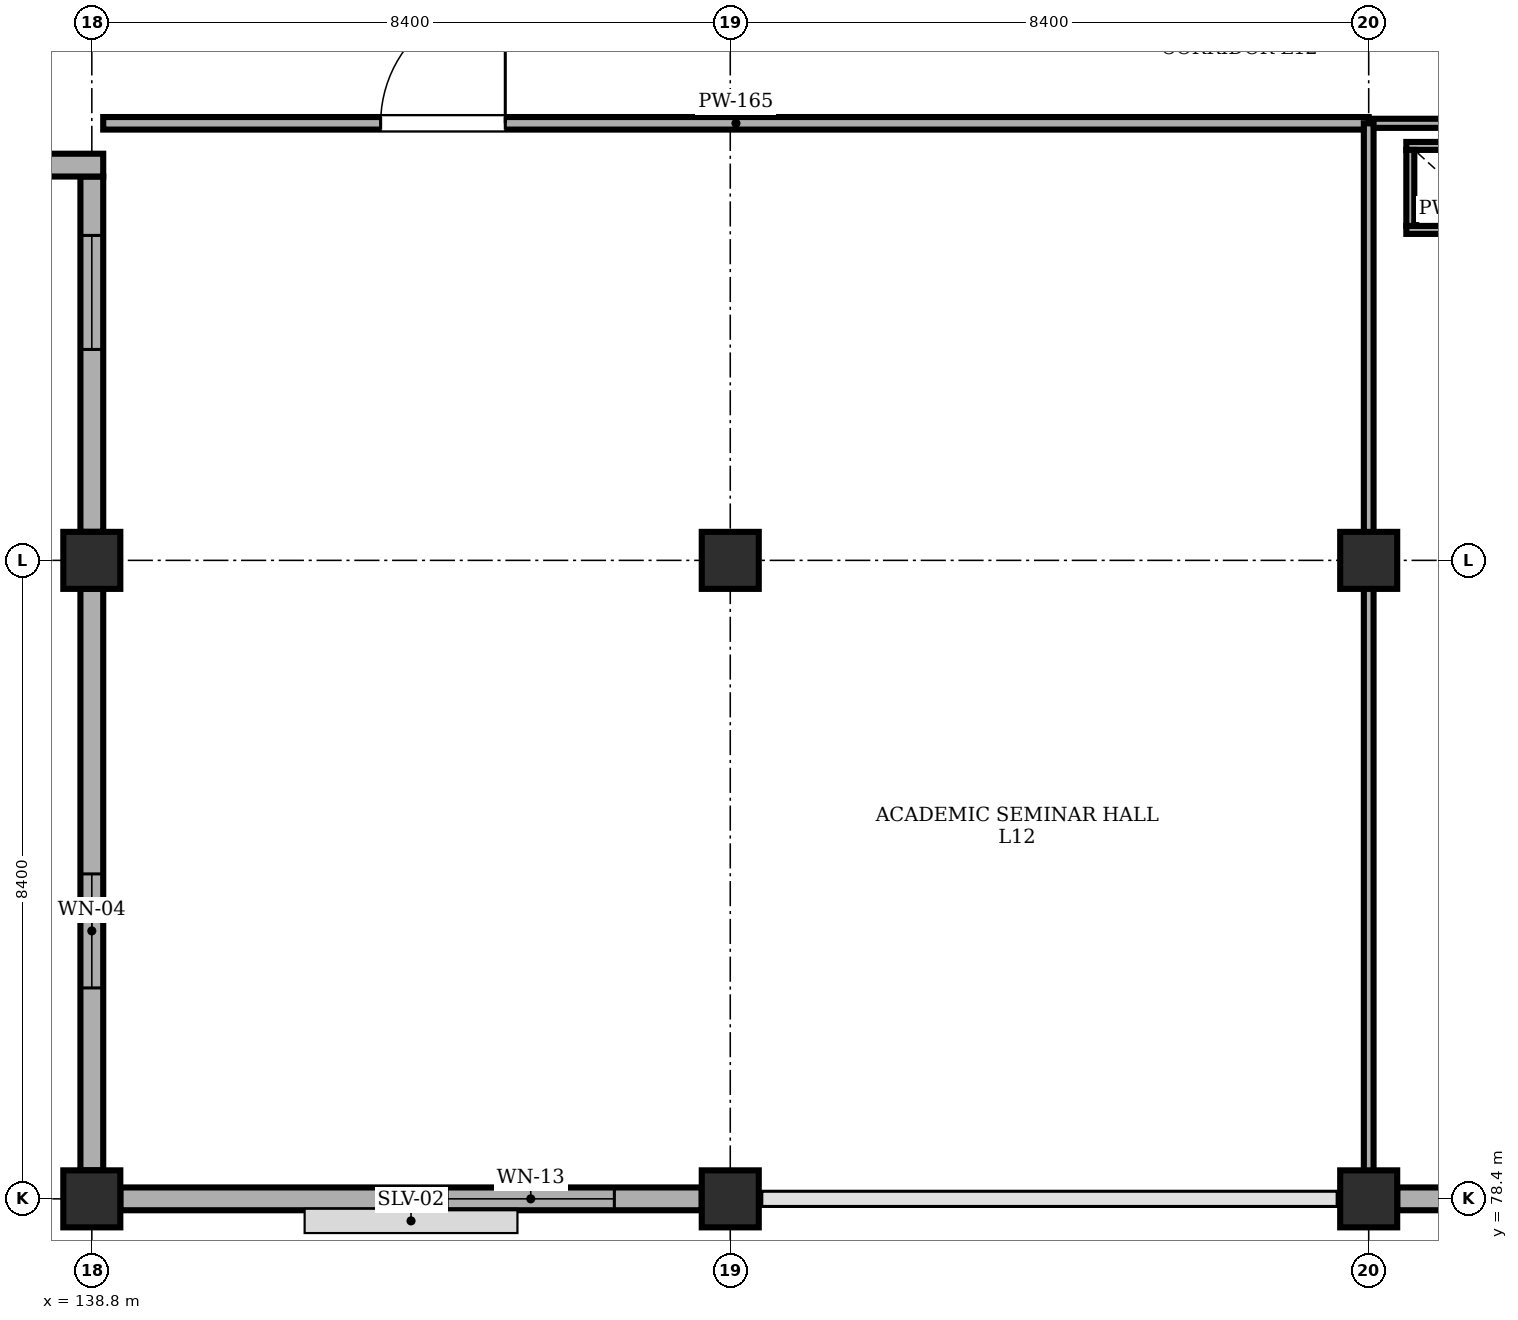
"""IFC4 building model, lengths in metres.
Left out: names, types, materials, properties, quantities, classifications, styles, units other than length and angle.
Written with IfcOpenShell. Run it as: python <this file> out.ifc"""

import sys

from ifc_helpers import new_model, si_unit, direction, frame, frame_2d, origin, origin_2d, place, context, subcontext, project, spatial, rectangle, extrude, element, fill, save


model = new_model("IFC4")
c1 = context("Model", 3, precision=1e-05, world=origin(), true_north=direction((0.0, 1.0)))
c2 = subcontext(c1, "Body", "Model", "MODEL_VIEW")
j1 = project(units=[si_unit("LENGTHUNIT", "METRE"), si_unit("PLANEANGLEUNIT", "RADIAN")], contexts=[c1])
p1 = place(None, origin())
s1 = spatial("IfcSite", under=j1, at=p1, CompositionType="ELEMENT")
p2 = place(p1, origin())
s2 = spatial("IfcBuilding", under=s1, at=p2, CompositionType="ELEMENT")
p3 = place(p2, frame((0.0, 0.0, 48.6)))
s3 = spatial("IfcBuildingStorey", under=s2, at=p3, CompositionType="ELEMENT", Elevation=48.6)
for number, where, z_axis, x_axis in (
    (1, (138.8, 78.4, 0.0), (0.0, 0.0, 1.0), (1.0, 0.0, 0.0)),
    (2, (138.8, 86.8, 0.0), (0.0, 0.0, 1.0), (1.0, 0.0, 0.0)),
    (3, (147.2, 78.4, 0.0), (0.0, 0.0, 1.0), (1.0, 0.0, 0.0)),
    (4, (147.2, 86.8, 0.0), (0.0, 0.0, 1.0), (1.0, 0.0, 0.0)),
    (5, (155.6, 78.4, 0.0), (0.0, 0.0, 1.0), (1.0, 0.0, 0.0)),
    (6, (155.6, 86.8, 0.0), (0.0, 0.0, 1.0), (1.0, 0.0, 0.0)),
):
    element("IfcColumn", number, at=place(p3, frame(where, z_axis=z_axis, x_axis=x_axis)), inside=s3, PredefinedType="COLUMN", context=c2, shape_type="SweptSolid", body=[
        extrude(rectangle(XDim=0.75, YDim=0.75, at=origin_2d()), origin(), (0.0, 0.0, 1.0), 4.03),
    ])
p4 = place(p3, frame((146.825, 78.4, 0.0), z_axis=(0.0, 0.0, 1.0), x_axis=(-1.0, 0.0, 0.0)))
e7 = element("IfcWall", 7, at=p4, inside=s3, PredefinedType="STANDARD", context=c2, shape_type="SweptSolid", body=[
    extrude(rectangle(XDim=7.65, YDim=0.3, at=frame_2d((3.825, 0.0))), origin(), (0.0, 0.0, 1.0), 3.33),
])
p5 = place(p4, frame((1.15, 0.0, 0.95)))
e8 = element("IfcOpeningElement", 8, at=p5, cuts=e7, PredefinedType="OPENING", context=c2, shape_type="SweptSolid", body=[
    extrude(rectangle(XDim=2.2, YDim=2.0, at=frame_2d((1.1, 1.0))), frame((0.0, 0.16, 0.0), z_axis=(0.0, -1.0, 0.0), x_axis=(1.0, 0.0, 0.0)), (0.0, 0.0, 1.0), 0.32),
])
p6 = place(p3, frame((163.075, 78.4, 0.0), z_axis=(0.0, 0.0, 1.0), x_axis=(-1.0, 0.0, 0.0)))
e9 = element("IfcWall", 9, at=p6, inside=s3, PredefinedType="STANDARD", context=c2, shape_type="SweptSolid", body=[
    extrude(rectangle(XDim=7.1, YDim=0.3, at=frame_2d((3.55, 0.0))), origin(), (0.0, 0.0, 1.0), 3.33),
])
p7 = place(p6, frame((1.15, 0.0, 0.95)))
e10 = element("IfcOpeningElement", 10, at=p7, cuts=e9, PredefinedType="OPENING", context=c2, shape_type="SweptSolid", body=[
    extrude(rectangle(XDim=2.2, YDim=2.0, at=frame_2d((1.1, 1.0))), frame((0.0, 0.16, 0.0), z_axis=(0.0, -1.0, 0.0), x_axis=(1.0, 0.0, 0.0)), (0.0, 0.0, 1.0), 0.32),
])
p8 = place(p3, frame((138.8, 78.775, 0.0), z_axis=(0.0, 0.0, 1.0), x_axis=(0.0, 1.0, 0.0)))
e11 = element("IfcWall", 11, at=p8, inside=s3, PredefinedType="STANDARD", context=c2, shape_type="SweptSolid", body=[
    extrude(rectangle(XDim=7.65, YDim=0.3, at=frame_2d((3.825, 0.0))), origin(), (0.0, 0.0, 1.0), 3.33),
])
p9 = place(p8, frame((2.4, 0.0, 0.95)))
e12 = element("IfcOpeningElement", 12, at=p9, cuts=e11, PredefinedType="OPENING", context=c2, shape_type="SweptSolid", body=[
    extrude(rectangle(XDim=1.5, YDim=1.8, at=frame_2d((0.75, 0.9))), frame((0.0, 0.16, 0.0), z_axis=(0.0, -1.0, 0.0), x_axis=(1.0, 0.0, 0.0)), (0.0, 0.0, 1.0), 0.32),
])
p10 = place(p3, frame((138.8, 87.175, 0.0), z_axis=(0.0, 0.0, 1.0), x_axis=(0.0, 1.0, 0.0)))
e13 = element("IfcWall", 13, at=p10, inside=s3, PredefinedType="STANDARD", context=c2, shape_type="SweptSolid", body=[
    extrude(rectangle(XDim=4.675, YDim=0.3, at=frame_2d((2.337, 0.0))), origin(), (0.0, 0.0, 1.0), 3.33),
])
p11 = place(p10, frame((2.4, 0.0, 0.95)))
e14 = element("IfcOpeningElement", 14, at=p11, cuts=e13, PredefinedType="OPENING", context=c2, shape_type="SweptSolid", body=[
    extrude(rectangle(XDim=1.5, YDim=1.8, at=frame_2d((0.75, 0.9))), frame((0.0, 0.16, 0.0), z_axis=(0.0, -1.0, 0.0), x_axis=(1.0, 0.0, 0.0)), (0.0, 0.0, 1.0), 0.32),
])
p12 = place(p3, frame((138.95, 92.0, 0.0), z_axis=(0.0, 0.0, 1.0), x_axis=(-1.0, 0.0, 0.0)))
e15 = element("IfcWall", 15, at=p12, inside=s3, PredefinedType="STANDARD", context=c2, shape_type="SweptSolid", body=[
    extrude(rectangle(XDim=8.7, YDim=0.3, at=frame_2d((4.35, 0.0))), origin(), (0.0, 0.0, 1.0), 4.03),
])
p13 = place(p3, frame((138.95, 92.55, 0.0), z_axis=(0.0, 0.0, 1.0), x_axis=(1.0, 0.0, 0.0)))
e16 = element("IfcWall", 16, at=p13, inside=s3, PredefinedType="PARTITIONING", context=c2, shape_type="SweptSolid", body=[
    extrude(rectangle(XDim=16.65, YDim=0.165, at=frame_2d((8.325, 0.0))), origin(), (0.0, 0.0, 1.0), 4.03),
])
p14 = place(p13, frame((3.65, 0.0, 0.0)))
e17 = element("IfcOpeningElement", 17, at=p14, cuts=e16, PredefinedType="OPENING", context=c2, shape_type="SweptSolid", body=[
    extrude(rectangle(XDim=1.64, YDim=2.24, at=frame_2d((0.82, 1.12))), frame((0.0, 0.093, 0.0), z_axis=(0.0, -1.0, 0.0), x_axis=(1.0, 0.0, 0.0)), (0.0, 0.0, 1.0), 0.185),
])
p15 = place(p3, frame((155.6, 92.55, 0.0), z_axis=(0.0, 0.0, 1.0), x_axis=(1.0, 0.0, 0.0)))
e18 = element("IfcWall", 18, at=p15, inside=s3, PredefinedType="PARTITIONING", context=c2, shape_type="SweptSolid", body=[
    extrude(rectangle(XDim=7.75, YDim=0.12, at=frame_2d((3.875, 0.0))), origin(), (0.0, 0.0, 1.0), 4.03),
])
p16 = place(p15, frame((3.4, 0.0, 0.0)))
e19 = element("IfcOpeningElement", 19, at=p16, cuts=e18, PredefinedType="OPENING", context=c2, shape_type="SweptSolid", body=[
    extrude(rectangle(XDim=1.08, YDim=2.15, at=frame_2d((0.54, 1.075))), frame((0.0, 0.07, 0.0), z_axis=(0.0, -1.0, 0.0), x_axis=(1.0, 0.0, 0.0)), (0.0, 0.0, 1.0), 0.14),
])
p17 = place(p3, frame((155.6, 78.55, 0.0), z_axis=(0.0, 0.0, 1.0), x_axis=(0.0, 1.0, 0.0)))
e20 = element("IfcWall", 20, at=p17, inside=s3, PredefinedType="PARTITIONING", context=c2, shape_type="SweptSolid", body=[
    extrude(rectangle(XDim=14.0, YDim=0.128, at=frame_2d((7.0, 0.0))), origin(), (0.0, 0.0, 1.0), 3.33),
])
for number, where, z_axis, x_axis in (
    (21, (156.095, 91.147, 0.0), (0.0, 0.0, 1.0), (1.0, 0.0, 0.0)),
    (22, (156.095, 92.252, 0.0), (0.0, 0.0, 1.0), (1.0, 0.0, 0.0)),
):
    element("IfcWall", number, at=place(p3, frame(where, z_axis=z_axis, x_axis=x_axis)), inside=s3, PredefinedType="PARTITIONING", context=c2, shape_type="SweptSolid", body=[
        extrude(rectangle(XDim=1.31, YDim=0.105, at=frame_2d((0.655, 0.0))), origin(), (0.0, 0.0, 1.0), 4.03),
    ])
p18 = place(p3, frame((156.147, 91.2, 0.0), z_axis=(0.0, 0.0, 1.0), x_axis=(0.0, 1.0, 0.0)))
e23 = element("IfcWall", 23, at=p18, inside=s3, PredefinedType="PARTITIONING", context=c2, shape_type="SweptSolid", body=[
    extrude(rectangle(XDim=1.0, YDim=0.105, at=frame_2d((0.5, 0.0))), origin(), (0.0, 0.0, 1.0), 4.03),
])
p19 = place(p5, origin())
e24 = element("IfcWindow", 24, at=p19, inside=s3, PartitioningType="DOUBLE_PANEL_VERTICAL", PredefinedType="WINDOW", context=c2, shape_type="SweptSolid", body=[
    extrude(rectangle(XDim=2.2, YDim=2.0, at=frame_2d((1.1, 1.0))), frame((0.0, 0.03, 0.0), z_axis=(0.0, -1.0, 0.0), x_axis=(1.0, 0.0, 0.0)), (0.0, 0.0, 1.0), 0.06),
])
fill(e8, e24)
p20 = place(p9, origin())
e25 = element("IfcWindow", 25, at=p20, inside=s3, PartitioningType="DOUBLE_PANEL_VERTICAL", PredefinedType="WINDOW", context=c2, shape_type="SweptSolid", body=[
    extrude(rectangle(XDim=1.5, YDim=1.8, at=frame_2d((0.75, 0.9))), frame((0.0, 0.03, 0.0), z_axis=(0.0, -1.0, 0.0), x_axis=(1.0, 0.0, 0.0)), (0.0, 0.0, 1.0), 0.06),
])
fill(e12, e25)
p21 = place(p11, origin())
e26 = element("IfcWindow", 26, at=p21, inside=s3, PartitioningType="DOUBLE_PANEL_VERTICAL", PredefinedType="WINDOW", context=c2, shape_type="SweptSolid", body=[
    extrude(rectangle(XDim=1.5, YDim=1.8, at=frame_2d((0.75, 0.9))), frame((0.0, 0.03, 0.0), z_axis=(0.0, -1.0, 0.0), x_axis=(1.0, 0.0, 0.0)), (0.0, 0.0, 1.0), 0.06),
])
fill(e14, e26)
p22 = place(p14, origin())
e27 = element("IfcDoor", 27, at=p22, inside=s3, OperationType="SINGLE_SWING_RIGHT", PredefinedType="DOOR", context=c2, shape_type="SweptSolid", body=[
    extrude(rectangle(XDim=1.64, YDim=2.24, at=frame_2d((0.82, 1.12))), frame((0.0, 0.025, 0.0), z_axis=(0.0, -1.0, 0.0), x_axis=(1.0, 0.0, 0.0)), (0.0, 0.0, 1.0), 0.05),
])
fill(e17, e27)
save(model, sys.argv[1])
